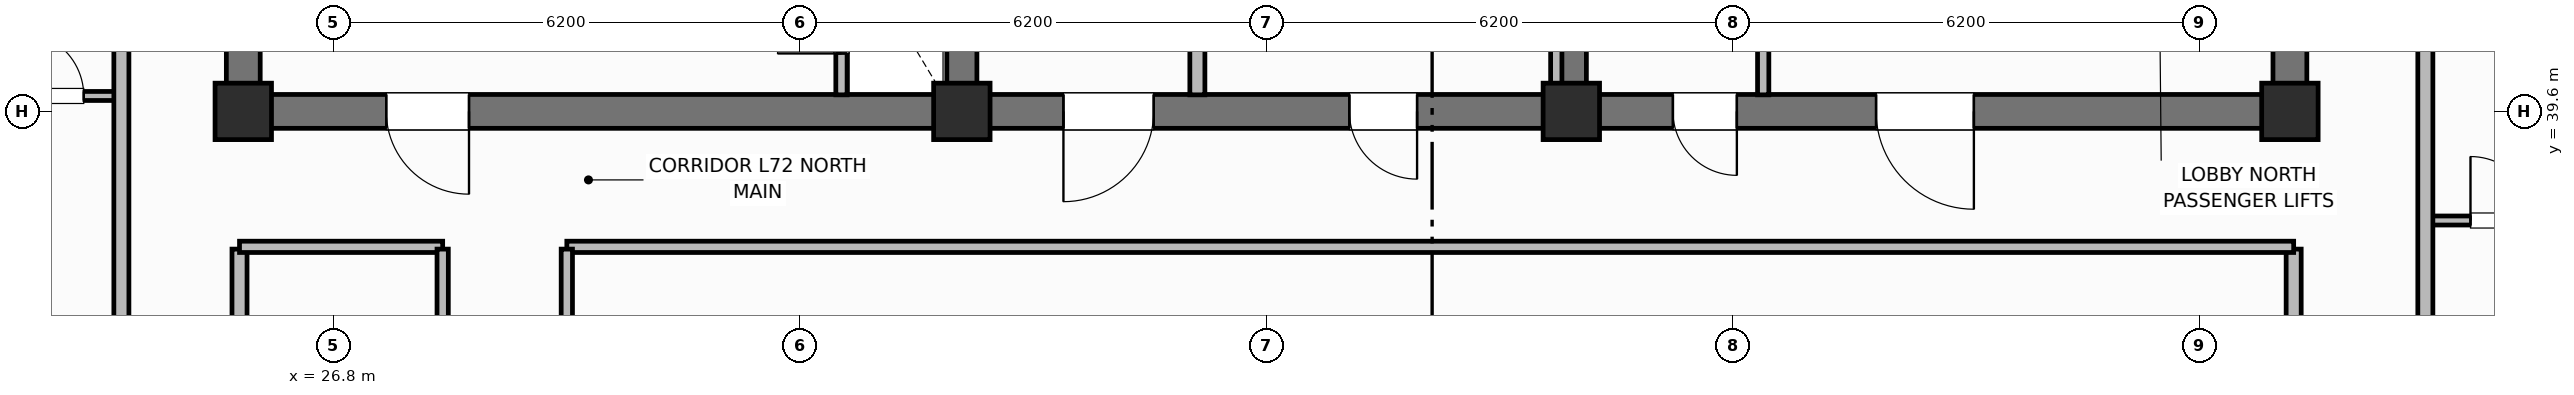
"""IFC4 building model, lengths in metres.
Left out: names, types, materials, properties, quantities, classifications, styles, units other than length and angle.
Written with IfcOpenShell. Run it as: python <this file> out.ifc"""

import sys

from ifc_helpers import new_model, si_unit, direction, frame, frame_2d, origin, origin_2d, place, context, subcontext, project, spatial, rectangle, extrude, element, fill, save


model = new_model("IFC4")
c1 = context("Model", 3, precision=1e-05, world=origin(), true_north=direction((0.0, 1.0)))
c2 = subcontext(c1, "Body", "Model", "MODEL_VIEW")
j1 = project(units=[si_unit("LENGTHUNIT", "METRE"), si_unit("PLANEANGLEUNIT", "RADIAN")], contexts=[c1])
p1 = place(None, origin())
s1 = spatial("IfcSite", under=j1, at=p1, CompositionType="ELEMENT")
p2 = place(p1, origin())
s2 = spatial("IfcBuilding", under=s1, at=p2, CompositionType="ELEMENT")
p3 = place(p2, frame((0.0, 0.0, 286.1)))
s3 = spatial("IfcBuildingStorey", under=s2, at=p3, CompositionType="ELEMENT", Elevation=286.1)
for number, where, z_axis, x_axis in (
    (1, (25.6, 39.825, 0.0), (0.0, 0.0, 1.0), (0.0, 1.0, 0.0)),
    (2, (52.8, 39.825, 0.0), (0.0, 0.0, 1.0), (0.0, 1.0, 0.0)),
):
    element("IfcWall", number, at=place(p3, frame(where, z_axis=z_axis, x_axis=x_axis)), inside=s3, PredefinedType="SHEAR", context=c2, shape_type="SweptSolid", body=[
        extrude(rectangle(XDim=5.75, YDim=0.45, at=frame_2d((2.875, 0.0))), origin(), (0.0, 0.0, 1.0), 3.7),
    ])
p4 = place(p3, frame((52.8, 39.6, 0.0), z_axis=(0.0, 0.0, 1.0), x_axis=(-1.0, 0.0, 0.0)))
e3 = element("IfcWall", 3, at=p4, inside=s3, PredefinedType="SHEAR", context=c2, shape_type="SweptSolid", body=[
    extrude(rectangle(XDim=27.2, YDim=0.45, at=frame_2d((13.6, 0.0))), origin(), (0.0, 0.0, 1.0), 3.7),
])
p5 = place(p4, frame((24.2, 0.0, 0.0)))
e4 = element("IfcOpeningElement", 4, at=p5, cuts=e3, PredefinedType="OPENING", context=c2, shape_type="SweptSolid", body=[
    extrude(rectangle(XDim=1.1, YDim=2.15, at=frame_2d((0.55, 1.075))), frame((0.0, 0.235, 0.0), z_axis=(0.0, -1.0, 0.0), x_axis=(1.0, 0.0, 0.0)), (0.0, 0.0, 1.0), 0.47),
])
p6 = place(p4, frame((15.1, 0.0, 0.0)))
e5 = element("IfcOpeningElement", 5, at=p6, cuts=e3, PredefinedType="OPENING", context=c2, shape_type="SweptSolid", body=[
    extrude(rectangle(XDim=1.2, YDim=2.15, at=frame_2d((0.6, 1.075))), frame((0.0, 0.235, 0.0), z_axis=(0.0, -1.0, 0.0), x_axis=(1.0, 0.0, 0.0)), (0.0, 0.0, 1.0), 0.47),
])
p7 = place(p4, frame((11.6, 0.0, 0.0)))
e6 = element("IfcOpeningElement", 6, at=p7, cuts=e3, PredefinedType="OPENING", context=c2, shape_type="SweptSolid", body=[
    extrude(rectangle(XDim=0.9, YDim=2.1, at=frame_2d((0.45, 1.05))), frame((0.0, 0.235, 0.0), z_axis=(0.0, -1.0, 0.0), x_axis=(1.0, 0.0, 0.0)), (0.0, 0.0, 1.0), 0.47),
])
p8 = place(p4, frame((7.35, 0.0, 0.0)))
e7 = element("IfcOpeningElement", 7, at=p8, cuts=e3, PredefinedType="OPENING", context=c2, shape_type="SweptSolid", body=[
    extrude(rectangle(XDim=0.85, YDim=2.1, at=frame_2d((0.425, 1.05))), frame((0.0, 0.235, 0.0), z_axis=(0.0, -1.0, 0.0), x_axis=(1.0, 0.0, 0.0)), (0.0, 0.0, 1.0), 0.47),
])
p9 = place(p4, frame((4.2, 0.0, 0.0)))
e8 = element("IfcOpeningElement", 8, at=p9, cuts=e3, PredefinedType="OPENING", context=c2, shape_type="SweptSolid", body=[
    extrude(rectangle(XDim=1.3, YDim=2.2, at=frame_2d((0.65, 1.1))), frame((0.0, 0.235, 0.0), z_axis=(0.0, -1.0, 0.0), x_axis=(1.0, 0.0, 0.0)), (0.0, 0.0, 1.0), 0.47),
])
for number, where, z_axis, x_axis in (
    (9, (35.15, 39.825, 0.0), (0.0, 0.0, 1.0), (0.0, 1.0, 0.0)),
    (10, (43.25, 39.825, 0.0), (0.0, 0.0, 1.0), (0.0, 1.0, 0.0)),
):
    element("IfcWall", number, at=place(p3, frame(where, z_axis=z_axis, x_axis=x_axis)), inside=s3, PredefinedType="SHEAR", context=c2, shape_type="SweptSolid", body=[
        extrude(rectangle(XDim=5.75, YDim=0.4, at=frame_2d((2.875, 0.0))), origin(), (0.0, 0.0, 1.0), 3.7),
    ])
for number, where, z_axis, x_axis in (
    (11, (25.6, 39.6, 0.0), (0.0, 0.0, 1.0), (1.0, 0.0, 0.0)),
    (12, (35.15, 39.6, 0.0), (0.0, 0.0, 1.0), (1.0, 0.0, 0.0)),
    (13, (43.25, 39.6, 0.0), (0.0, 0.0, 1.0), (1.0, 0.0, 0.0)),
    (14, (52.8, 39.6, 0.0), (0.0, 0.0, 1.0), (1.0, 0.0, 0.0)),
):
    element("IfcColumn", number, at=place(p3, frame(where, z_axis=z_axis, x_axis=x_axis)), inside=s3, PredefinedType="COLUMN", context=c2, shape_type="SweptSolid", body=[
        extrude(rectangle(XDim=0.75, YDim=0.75, at=origin_2d()), origin(), (0.0, 0.0, 1.0), 3.7),
    ])
p10 = place(p3, frame((33.55, 39.82, 0.0), z_axis=(0.0, 0.0, 1.0), x_axis=(0.0, 1.0, 0.0)))
e15 = element("IfcWall", 15, at=p10, inside=s3, PredefinedType="PARTITIONING", context=c2, shape_type="SweptSolid", body=[
    extrude(rectangle(XDim=2.13, YDim=0.15, at=frame_2d((1.065, 0.0))), origin(), (0.0, 0.0, 1.0), 2.56),
])
p11 = place(p10, frame((0.55, 0.0, 0.0)))
e16 = element("IfcOpeningElement", 16, at=p11, cuts=e15, PredefinedType="OPENING", context=c2, shape_type="SweptSolid", body=[
    extrude(rectangle(XDim=0.85, YDim=2.05, at=frame_2d((0.425, 1.025))), frame((0.0, 0.085, 0.0), z_axis=(0.0, -1.0, 0.0), x_axis=(1.0, 0.0, 0.0)), (0.0, 0.0, 1.0), 0.17),
])
p12 = place(p3, frame((38.28, 39.82, 0.0), z_axis=(0.0, 0.0, 1.0), x_axis=(0.0, 1.0, 0.0)))
e17 = element("IfcWall", 17, at=p12, inside=s3, PredefinedType="PARTITIONING", context=c2, shape_type="SweptSolid", body=[
    extrude(rectangle(XDim=5.63, YDim=0.2, at=frame_2d((2.815, 0.0))), origin(), (0.0, 0.0, 1.0), 2.56),
])
for number, where, z_axis, x_axis in (
    (18, (43.05, 39.82, 0.0), (0.0, 0.0, 1.0), (0.0, 1.0, 0.0)),
    (19, (45.8, 39.82, 0.0), (0.0, 0.0, 1.0), (0.0, 1.0, 0.0)),
):
    element("IfcWall", number, at=place(p3, frame(where, z_axis=z_axis, x_axis=x_axis)), inside=s3, PredefinedType="PARTITIONING", context=c2, shape_type="SweptSolid", body=[
        extrude(rectangle(XDim=5.63, YDim=0.15, at=frame_2d((2.815, 0.0))), origin(), (0.0, 0.0, 1.0), 2.56),
    ])
for number, where, z_axis, x_axis in (
    (20, (25.55, 18.63, 0.0), (0.0, 0.0, 1.0), (0.0, 1.0, 0.0)),
    (21, (52.85, 18.63, 0.0), (0.0, 0.0, 1.0), (0.0, 1.0, 0.0)),
):
    element("IfcWall", number, at=place(p3, frame(where, z_axis=z_axis, x_axis=x_axis)), inside=s3, PredefinedType="PARTITIONING", context=c2, shape_type="SweptSolid", body=[
        extrude(rectangle(XDim=19.14, YDim=0.2, at=frame_2d((9.57, 0.0))), origin(), (0.0, 0.0, 1.0), 2.56),
    ])
p13 = place(p3, frame((25.55, 37.8, 0.0), z_axis=(0.0, 0.0, 1.0), x_axis=(1.0, 0.0, 0.0)))
e22 = element("IfcWall", 22, at=p13, inside=s3, PredefinedType="PARTITIONING", context=c2, shape_type="SweptSolid", body=[
    extrude(rectangle(XDim=2.7, YDim=0.15, at=frame_2d((1.35, 0.0))), origin(), (0.0, 0.0, 1.0), 2.56),
])
p14 = place(p3, frame((29.9, 37.8, 0.0), z_axis=(0.0, 0.0, 1.0), x_axis=(1.0, 0.0, 0.0)))
e23 = element("IfcWall", 23, at=p14, inside=s3, PredefinedType="PARTITIONING", context=c2, shape_type="SweptSolid", body=[
    extrude(rectangle(XDim=22.95, YDim=0.15, at=frame_2d((11.475, 0.0))), origin(), (0.0, 0.0, 1.0), 2.56),
])
p15 = place(p3, frame((28.25, 18.63, 0.0), z_axis=(0.0, 0.0, 1.0), x_axis=(0.0, 1.0, 0.0)))
e24 = element("IfcWall", 24, at=p15, inside=s3, PredefinedType="PARTITIONING", context=c2, shape_type="SweptSolid", body=[
    extrude(rectangle(XDim=19.14, YDim=0.15, at=frame_2d((9.57, 0.0))), origin(), (0.0, 0.0, 1.0), 2.56),
])
p16 = place(p15, frame((3.0, 0.0, 0.0)))
e25 = element("IfcOpeningElement", 25, at=p16, cuts=e24, PredefinedType="OPENING", context=c2, shape_type="SweptSolid", body=[
    extrude(rectangle(XDim=0.9, YDim=2.1, at=frame_2d((0.45, 1.05))), frame((0.0, 0.085, 0.0), z_axis=(0.0, -1.0, 0.0), x_axis=(1.0, 0.0, 0.0)), (0.0, 0.0, 1.0), 0.17),
])
p17 = place(p15, frame((11.5, 0.0, 0.0)))
e26 = element("IfcOpeningElement", 26, at=p17, cuts=e24, PredefinedType="OPENING", context=c2, shape_type="SweptSolid", body=[
    extrude(rectangle(XDim=0.9, YDim=2.1, at=frame_2d((0.45, 1.05))), frame((0.0, 0.085, 0.0), z_axis=(0.0, -1.0, 0.0), x_axis=(1.0, 0.0, 0.0)), (0.0, 0.0, 1.0), 0.17),
])
p18 = place(p3, frame((29.9, 18.63, 0.0), z_axis=(0.0, 0.0, 1.0), x_axis=(0.0, 1.0, 0.0)))
e27 = element("IfcWall", 27, at=p18, inside=s3, PredefinedType="PARTITIONING", context=c2, shape_type="SweptSolid", body=[
    extrude(rectangle(XDim=19.14, YDim=0.15, at=frame_2d((9.57, 0.0))), origin(), (0.0, 0.0, 1.0), 2.56),
])
p19 = place(p18, frame((2.4, 0.0, 0.0)))
e28 = element("IfcOpeningElement", 28, at=p19, cuts=e27, PredefinedType="OPENING", context=c2, shape_type="SweptSolid", body=[
    extrude(rectangle(XDim=1.0, YDim=2.15, at=frame_2d((0.5, 1.075))), frame((0.0, 0.085, 0.0), z_axis=(0.0, -1.0, 0.0), x_axis=(1.0, 0.0, 0.0)), (0.0, 0.0, 1.0), 0.17),
])
p20 = place(p18, frame((8.89, 0.0, 0.0)))
e29 = element("IfcOpeningElement", 29, at=p20, cuts=e27, PredefinedType="OPENING", context=c2, shape_type="SweptSolid", body=[
    extrude(rectangle(XDim=1.0, YDim=2.15, at=frame_2d((0.5, 1.075))), frame((0.0, 0.085, 0.0), z_axis=(0.0, -1.0, 0.0), x_axis=(1.0, 0.0, 0.0)), (0.0, 0.0, 1.0), 0.17),
])
p21 = place(p3, frame((22.03, 39.805, 0.0), z_axis=(0.0, 0.0, 1.0), x_axis=(1.0, 0.0, 0.0)))
e30 = element("IfcWall", 30, at=p21, inside=s3, PredefinedType="PARTITIONING", context=c2, shape_type="SweptSolid", body=[
    extrude(rectangle(XDim=1.95, YDim=0.12, at=frame_2d((0.975, 0.0))), origin(), (0.0, 0.0, 1.0), 2.56),
])
p22 = place(p21, frame((0.6, 0.0, 0.0)))
e31 = element("IfcOpeningElement", 31, at=p22, cuts=e30, PredefinedType="OPENING", context=c2, shape_type="SweptSolid", body=[
    extrude(rectangle(XDim=0.85, YDim=2.1, at=frame_2d((0.425, 1.05))), frame((0.0, 0.07, 0.0), z_axis=(0.0, -1.0, 0.0), x_axis=(1.0, 0.0, 0.0)), (0.0, 0.0, 1.0), 0.14),
])
p23 = place(p3, frame((23.98, 9.95, 0.0), z_axis=(0.0, 0.0, 1.0), x_axis=(0.0, 1.0, 0.0)))
e32 = element("IfcWall", 32, at=p23, inside=s3, PredefinedType="PARTITIONING", context=c2, shape_type="SweptSolid", body=[
    extrude(rectangle(XDim=36.5, YDim=0.2, at=frame_2d((18.25, 0.0))), origin(), (0.0, 0.0, 1.0), 2.56),
])
p24 = place(p23, frame((3.25, 0.0, 0.0)))
e33 = element("IfcOpeningElement", 33, at=p24, cuts=e32, PredefinedType="OPENING", context=c2, shape_type="SweptSolid", body=[
    extrude(rectangle(XDim=1.0, YDim=2.15, at=frame_2d((0.5, 1.075))), frame((0.0, 0.11, 0.0), z_axis=(0.0, -1.0, 0.0), x_axis=(1.0, 0.0, 0.0)), (0.0, 0.0, 1.0), 0.22),
])
p25 = place(p23, frame((13.3, 0.0, 0.0)))
e34 = element("IfcOpeningElement", 34, at=p25, cuts=e32, PredefinedType="OPENING", context=c2, shape_type="SweptSolid", body=[
    extrude(rectangle(XDim=1.0, YDim=2.15, at=frame_2d((0.5, 1.075))), frame((0.0, 0.11, 0.0), z_axis=(0.0, -1.0, 0.0), x_axis=(1.0, 0.0, 0.0)), (0.0, 0.0, 1.0), 0.22),
])
p26 = place(p23, frame((25.005, 0.0, 0.0)))
e35 = element("IfcOpeningElement", 35, at=p26, cuts=e32, PredefinedType="OPENING", context=c2, shape_type="SweptSolid", body=[
    extrude(rectangle(XDim=1.0, YDim=2.15, at=frame_2d((0.5, 1.075))), frame((0.0, 0.11, 0.0), z_axis=(0.0, -1.0, 0.0), x_axis=(1.0, 0.0, 0.0)), (0.0, 0.0, 1.0), 0.22),
])
p27 = place(p3, frame((54.6, 38.15, 0.0), z_axis=(0.0, 0.0, 1.0), x_axis=(1.0, 0.0, 0.0)))
e36 = element("IfcWall", 36, at=p27, inside=s3, PredefinedType="PARTITIONING", context=c2, shape_type="SweptSolid", body=[
    extrude(rectangle(XDim=1.95, YDim=0.12, at=frame_2d((0.975, 0.0))), origin(), (0.0, 0.0, 1.0), 2.56),
])
p28 = place(p27, frame((0.6, 0.0, 0.0)))
e37 = element("IfcOpeningElement", 37, at=p28, cuts=e36, PredefinedType="OPENING", context=c2, shape_type="SweptSolid", body=[
    extrude(rectangle(XDim=0.85, YDim=2.1, at=frame_2d((0.425, 1.05))), frame((0.0, 0.07, 0.0), z_axis=(0.0, -1.0, 0.0), x_axis=(1.0, 0.0, 0.0)), (0.0, 0.0, 1.0), 0.14),
])
p29 = place(p3, frame((54.6, 9.95, 0.0), z_axis=(0.0, 0.0, 1.0), x_axis=(0.0, 1.0, 0.0)))
e38 = element("IfcWall", 38, at=p29, inside=s3, PredefinedType="PARTITIONING", context=c2, shape_type="SweptSolid", body=[
    extrude(rectangle(XDim=36.5, YDim=0.2, at=frame_2d((18.25, 0.0))), origin(), (0.0, 0.0, 1.0), 2.56),
])
p30 = place(p29, frame((3.25, 0.0, 0.0)))
e39 = element("IfcOpeningElement", 39, at=p30, cuts=e38, PredefinedType="OPENING", context=c2, shape_type="SweptSolid", body=[
    extrude(rectangle(XDim=1.0, YDim=2.15, at=frame_2d((0.5, 1.075))), frame((0.0, 0.11, 0.0), z_axis=(0.0, -1.0, 0.0), x_axis=(1.0, 0.0, 0.0)), (0.0, 0.0, 1.0), 0.22),
])
p31 = place(p29, frame((23.5, 0.0, 0.0)))
e40 = element("IfcOpeningElement", 40, at=p31, cuts=e38, PredefinedType="OPENING", context=c2, shape_type="SweptSolid", body=[
    extrude(rectangle(XDim=1.0, YDim=2.15, at=frame_2d((0.5, 1.075))), frame((0.0, 0.11, 0.0), z_axis=(0.0, -1.0, 0.0), x_axis=(1.0, 0.0, 0.0)), (0.0, 0.0, 1.0), 0.22),
])
p32 = place(p11, origin())
e41 = element("IfcDoor", 41, at=p32, inside=s3, OperationType="SINGLE_SWING_LEFT", PredefinedType="TRAPDOOR", context=c2, shape_type="SweptSolid", body=[
    extrude(rectangle(XDim=0.85, YDim=2.05, at=frame_2d((0.425, 1.025))), frame((0.0, 0.025, 0.0), z_axis=(0.0, -1.0, 0.0), x_axis=(1.0, 0.0, 0.0)), (0.0, 0.0, 1.0), 0.05),
])
fill(e16, e41)
p33 = place(p22, origin())
e42 = element("IfcDoor", 42, at=p33, inside=s3, OperationType="SINGLE_SWING_LEFT", PredefinedType="DOOR", context=c2, shape_type="SweptSolid", body=[
    extrude(rectangle(XDim=0.85, YDim=2.1, at=frame_2d((0.425, 1.05))), frame((0.0, 0.025, 0.0), z_axis=(0.0, -1.0, 0.0), x_axis=(1.0, 0.0, 0.0)), (0.0, 0.0, 1.0), 0.05),
])
fill(e31, e42)
p34 = place(p28, origin())
e43 = element("IfcDoor", 43, at=p34, inside=s3, OperationType="SINGLE_SWING_LEFT", PredefinedType="DOOR", context=c2, shape_type="SweptSolid", body=[
    extrude(rectangle(XDim=0.85, YDim=2.1, at=frame_2d((0.425, 1.05))), frame((0.0, 0.025, 0.0), z_axis=(0.0, -1.0, 0.0), x_axis=(1.0, 0.0, 0.0)), (0.0, 0.0, 1.0), 0.05),
])
fill(e37, e43)
p35 = place(p5, origin())
e44 = element("IfcDoor", 44, at=p35, inside=s3, OperationType="SINGLE_SWING_LEFT", PredefinedType="DOOR", context=c2, shape_type="SweptSolid", body=[
    extrude(rectangle(XDim=1.1, YDim=2.15, at=frame_2d((0.55, 1.075))), frame((0.0, 0.025, 0.0), z_axis=(0.0, -1.0, 0.0), x_axis=(1.0, 0.0, 0.0)), (0.0, 0.0, 1.0), 0.05),
])
fill(e4, e44)
p36 = place(p6, origin())
e45 = element("IfcDoor", 45, at=p36, inside=s3, OperationType="SINGLE_SWING_RIGHT", PredefinedType="DOOR", context=c2, shape_type="SweptSolid", body=[
    extrude(rectangle(XDim=1.2, YDim=2.15, at=frame_2d((0.6, 1.075))), frame((0.0, 0.025, 0.0), z_axis=(0.0, -1.0, 0.0), x_axis=(1.0, 0.0, 0.0)), (0.0, 0.0, 1.0), 0.05),
])
fill(e5, e45)
p37 = place(p7, origin())
e46 = element("IfcDoor", 46, at=p37, inside=s3, OperationType="SINGLE_SWING_LEFT", PredefinedType="DOOR", context=c2, shape_type="SweptSolid", body=[
    extrude(rectangle(XDim=0.9, YDim=2.1, at=frame_2d((0.45, 1.05))), frame((0.0, 0.025, 0.0), z_axis=(0.0, -1.0, 0.0), x_axis=(1.0, 0.0, 0.0)), (0.0, 0.0, 1.0), 0.05),
])
fill(e6, e46)
p38 = place(p8, origin())
e47 = element("IfcDoor", 47, at=p38, inside=s3, OperationType="SINGLE_SWING_LEFT", PredefinedType="DOOR", context=c2, shape_type="SweptSolid", body=[
    extrude(rectangle(XDim=0.85, YDim=2.1, at=frame_2d((0.425, 1.05))), frame((0.0, 0.025, 0.0), z_axis=(0.0, -1.0, 0.0), x_axis=(1.0, 0.0, 0.0)), (0.0, 0.0, 1.0), 0.05),
])
fill(e7, e47)
p39 = place(p9, origin())
e48 = element("IfcDoor", 48, at=p39, inside=s3, OperationType="SINGLE_SWING_LEFT", PredefinedType="DOOR", context=c2, shape_type="SweptSolid", body=[
    extrude(rectangle(XDim=1.3, YDim=2.2, at=frame_2d((0.65, 1.1))), frame((0.0, 0.025, 0.0), z_axis=(0.0, -1.0, 0.0), x_axis=(1.0, 0.0, 0.0)), (0.0, 0.0, 1.0), 0.05),
])
fill(e8, e48)
save(model, sys.argv[1])
